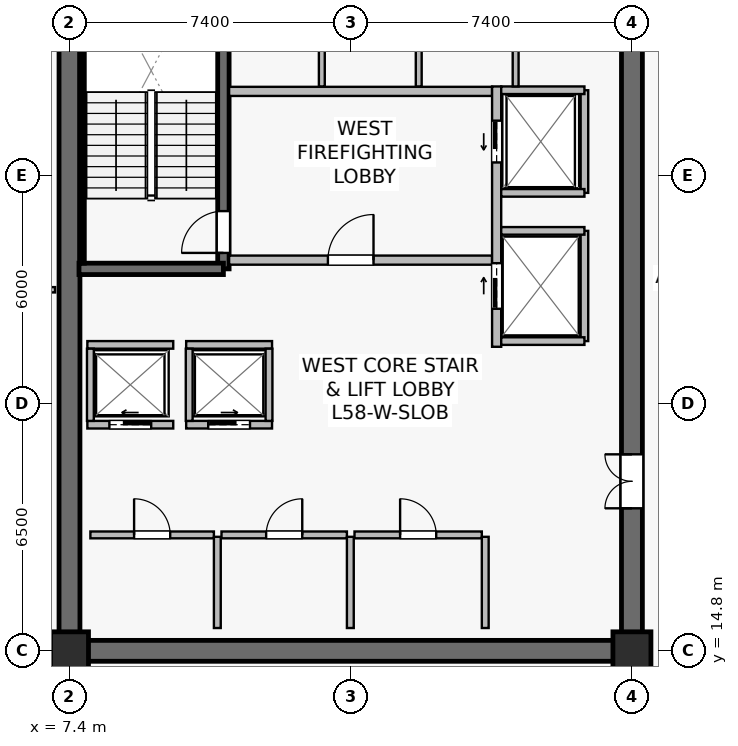
"""IFC4 building model, lengths in metres.
Left out: names, types, materials, properties, quantities, classifications, styles, units other than length and angle.
Written with IfcOpenShell. Run it as: python <this file> out.ifc"""

import sys

from ifc_helpers import new_model, si_unit, direction, frame, frame_2d, origin, origin_2d, place, context, subcontext, project, spatial, rectangle, extrude, source, transform, mapped, element, fill, save


model = new_model("IFC4")
c1 = context("Model", 3, precision=1e-05, world=origin(), true_north=direction((0.0, 1.0)))
c2 = subcontext(c1, "Body", "Model", "MODEL_VIEW")
j1 = project(units=[si_unit("LENGTHUNIT", "METRE"), si_unit("PLANEANGLEUNIT", "RADIAN")], contexts=[c1])
p1 = place(None, origin())
s1 = spatial("IfcSite", under=j1, at=p1, CompositionType="ELEMENT")
p2 = place(p1, origin())
s2 = spatial("IfcBuilding", under=s1, at=p2, CompositionType="ELEMENT")
p3 = place(p2, frame((0.0, 0.0, 242.4)))
s3 = spatial("IfcBuildingStorey", under=s2, at=p3, CompositionType="ELEMENT", Elevation=242.4)
p4 = place(p3, frame((7.125, 14.8, 0.0), z_axis=(0.0, 0.0, 1.0), x_axis=(1.0, 0.0, 0.0)))
e1 = element("IfcWall", 1, at=p4, inside=s3, PredefinedType="SHEAR", context=c2, shape_type="SweptSolid", body=[
    extrude(rectangle(XDim=15.35, YDim=0.55, at=frame_2d((7.675, 0.0))), origin(), (0.0, 0.0, 1.0), 3.8),
])
p5 = place(p3, frame((7.4, 15.075, 0.0), z_axis=(0.0, 0.0, 1.0), x_axis=(0.0, 1.0, 0.0)))
e2 = element("IfcWall", 2, at=p5, inside=s3, PredefinedType="SHEAR", context=c2, shape_type="SweptSolid", body=[
    extrude(rectangle(XDim=18.45, YDim=0.55, at=frame_2d((9.225, 0.0))), origin(), (0.0, 0.0, 1.0), 3.8),
])
p6 = place(p3, frame((22.2, 15.075, 0.0), z_axis=(0.0, 0.0, 1.0), x_axis=(0.0, 1.0, 0.0)))
e3 = element("IfcWall", 3, at=p6, inside=s3, PredefinedType="SHEAR", context=c2, shape_type="SweptSolid", body=[
    extrude(rectangle(XDim=18.45, YDim=0.55, at=frame_2d((9.225, 0.0))), origin(), (0.0, 0.0, 1.0), 3.8),
])
p7 = place(p6, frame((3.475, 0.0, 0.0)))
e4 = element("IfcOpeningElement", 4, at=p7, cuts=e3, PredefinedType="OPENING", context=c2, shape_type="SweptSolid", body=[
    extrude(rectangle(XDim=1.42, YDim=2.2, at=frame_2d((0.71, 1.1))), frame((0.0, 0.285, 0.0), z_axis=(0.0, -1.0, 0.0), x_axis=(1.0, 0.0, 0.0)), (0.0, 0.0, 1.0), 0.57),
])
p8 = place(p3, frame((11.45, 24.85, 0.0), z_axis=(0.0, 0.0, 1.0), x_axis=(0.0, 1.0, 0.0)))
e5 = element("IfcWall", 5, at=p8, inside=s3, PredefinedType="SHEAR", context=c2, shape_type="SweptSolid", body=[
    extrude(rectangle(XDim=8.63, YDim=0.3, at=frame_2d((4.315, 0.0))), origin(), (0.0, 0.0, 1.0), 3.8),
])
p9 = place(p8, frame((0.42, 0.0, 0.0)))
e6 = element("IfcOpeningElement", 6, at=p9, cuts=e5, PredefinedType="OPENING", context=c2, shape_type="SweptSolid", body=[
    extrude(rectangle(XDim=1.1, YDim=2.15, at=frame_2d((0.55, 1.075))), frame((0.0, 0.16, 0.0), z_axis=(0.0, -1.0, 0.0), x_axis=(1.0, 0.0, 0.0)), (0.0, 0.0, 1.0), 0.32),
])
p10 = place(p3, frame((7.65, 24.85, 0.0), z_axis=(0.0, 0.0, 1.0), x_axis=(1.0, 0.0, 0.0)))
e7 = element("IfcWall", 7, at=p10, inside=s3, PredefinedType="SHEAR", context=c2, shape_type="SweptSolid", body=[
    extrude(rectangle(XDim=3.8, YDim=0.3, at=frame_2d((1.9, 0.0))), origin(), (0.0, 0.0, 1.0), 3.8),
])
p11 = place(p3, frame((7.73, 25.0, 0.0), z_axis=(0.0, 0.0, 1.0), x_axis=(0.0, 1.0, 0.0)))
e8 = element("IfcWall", 8, at=p11, inside=s3, PredefinedType="SOLIDWALL", context=c2, shape_type="SweptSolid", body=[
    extrude(rectangle(XDim=8.32, YDim=0.12, at=frame_2d((4.16, 0.0))), origin(), (0.0, 0.0, 1.0), 3.8),
])
m1 = source(origin(), c2, "Body", "SweptSolid", [
    extrude(rectangle(XDim=1.0, YDim=1.0, at=origin_2d()), origin(), (0.0, 0.0, 1.0), 4.1),
])
for number, where, z_axis, x_axis in (
    (9, (7.4, 14.8, 0.0), (0.0, 0.0, 1.0), (1.0, 0.0, 0.0)),
    (10, (22.2, 14.8, 0.0), (0.0, 0.0, 1.0), (1.0, 0.0, 0.0)),
):
    element("IfcColumn", number, at=place(p3, frame(where, z_axis=z_axis, x_axis=x_axis)), inside=s3, PredefinedType="COLUMN", context=c2, shape_type="MappedRepresentation", body=[
        mapped(m1, transform((0.0, 0.0, 0.0), scale=1.0)),
    ])
p12 = place(p3, frame((11.6, 25.08, 0.0), z_axis=(0.0, 0.0, 1.0), x_axis=(1.0, 0.0, 0.0)))
e11 = element("IfcWall", 11, at=p12, inside=s3, PredefinedType="SOLIDWALL", context=c2, shape_type="SweptSolid", body=[
    extrude(rectangle(XDim=6.92, YDim=0.24, at=frame_2d((3.46, 0.0))), origin(), (0.0, 0.0, 1.0), 3.197),
])
p13 = place(p12, frame((2.6, 0.0, 0.0)))
e12 = element("IfcOpeningElement", 12, at=p13, cuts=e11, PredefinedType="OPENING", context=c2, shape_type="SweptSolid", body=[
    extrude(rectangle(XDim=1.2, YDim=2.16, at=frame_2d((0.6, 1.08))), frame((0.0, 0.13, 0.0), z_axis=(0.0, -1.0, 0.0), x_axis=(1.0, 0.0, 0.0)), (0.0, 0.0, 1.0), 0.26),
])
p14 = place(p3, frame((11.6, 29.52, 0.0), z_axis=(0.0, 0.0, 1.0), x_axis=(1.0, 0.0, 0.0)))
e13 = element("IfcWall", 13, at=p14, inside=s3, PredefinedType="SOLIDWALL", context=c2, shape_type="SweptSolid", body=[
    extrude(rectangle(XDim=6.92, YDim=0.24, at=frame_2d((3.46, 0.0))), origin(), (0.0, 0.0, 1.0), 3.197),
])
p15 = place(p3, frame((18.64, 22.8, 0.0), z_axis=(0.0, 0.0, 1.0), x_axis=(0.0, 1.0, 0.0)))
e14 = element("IfcWall", 14, at=p15, inside=s3, PredefinedType="SOLIDWALL", context=c2, shape_type="SweptSolid", body=[
    extrude(rectangle(XDim=6.85, YDim=0.24, at=frame_2d((3.425, 0.0))), origin(), (0.0, 0.0, 1.0), 2.935),
])
p16 = place(p15, frame((4.85, 0.0, 0.0)))
e15 = element("IfcOpeningElement", 15, at=p16, cuts=e14, PredefinedType="OPENING", context=c2, shape_type="SweptSolid", body=[
    extrude(rectangle(XDim=1.1, YDim=2.22, at=frame_2d((0.55, 1.11))), frame((0.0, 0.13, 0.0), z_axis=(0.0, -1.0, 0.0), x_axis=(1.0, 0.0, 0.0)), (0.0, 0.0, 1.0), 0.26),
])
p17 = place(p15, frame((1.0, 0.0, 0.0)))
e16 = element("IfcOpeningElement", 16, at=p17, cuts=e14, PredefinedType="OPENING", context=c2, shape_type="SweptSolid", body=[
    extrude(rectangle(XDim=1.2, YDim=2.22, at=frame_2d((0.6, 1.11))), frame((0.0, 0.13, 0.0), z_axis=(0.0, -1.0, 0.0), x_axis=(1.0, 0.0, 0.0)), (0.0, 0.0, 1.0), 0.26),
])
p18 = place(p3, frame((7.87, 20.75, 0.0), z_axis=(0.0, 0.0, 1.0), x_axis=(1.0, 0.0, 0.0)))
e17 = element("IfcWall", 17, at=p18, inside=s3, PredefinedType="SOLIDWALL", context=c2, shape_type="SweptSolid", body=[
    extrude(rectangle(XDim=2.26, YDim=0.2, at=frame_2d((1.13, 0.0))), origin(), (0.0, 0.0, 1.0), 3.8),
])
p19 = place(p18, frame((0.58, 0.0, 0.0)))
e18 = element("IfcOpeningElement", 18, at=p19, cuts=e17, PredefinedType="OPENING", context=c2, shape_type="SweptSolid", body=[
    extrude(rectangle(XDim=1.1, YDim=2.22, at=frame_2d((0.55, 1.11))), frame((0.0, 0.11, 0.0), z_axis=(0.0, -1.0, 0.0), x_axis=(1.0, 0.0, 0.0)), (0.0, 0.0, 1.0), 0.22),
])
p20 = place(p3, frame((7.87, 22.85, 0.0), z_axis=(0.0, 0.0, 1.0), x_axis=(1.0, 0.0, 0.0)))
e19 = element("IfcWall", 19, at=p20, inside=s3, PredefinedType="SOLIDWALL", context=c2, shape_type="SweptSolid", body=[
    extrude(rectangle(XDim=2.26, YDim=0.2, at=frame_2d((1.13, 0.0))), origin(), (0.0, 0.0, 1.0), 3.8),
])
p21 = place(p3, frame((7.95, 20.85, 0.0), z_axis=(0.0, 0.0, 1.0), x_axis=(0.0, 1.0, 0.0)))
e20 = element("IfcWall", 20, at=p21, inside=s3, PredefinedType="SOLIDWALL", context=c2, shape_type="SweptSolid", body=[
    extrude(rectangle(XDim=1.9, YDim=0.18, at=frame_2d((0.95, 0.0))), origin(), (0.0, 0.0, 1.0), 3.8),
])
p22 = place(p3, frame((10.47, 20.75, 0.0), z_axis=(0.0, 0.0, 1.0), x_axis=(1.0, 0.0, 0.0)))
e21 = element("IfcWall", 21, at=p22, inside=s3, PredefinedType="SOLIDWALL", context=c2, shape_type="SweptSolid", body=[
    extrude(rectangle(XDim=2.26, YDim=0.2, at=frame_2d((1.13, 0.0))), origin(), (0.0, 0.0, 1.0), 3.8),
])
p23 = place(p22, frame((0.58, 0.0, 0.0)))
e22 = element("IfcOpeningElement", 22, at=p23, cuts=e21, PredefinedType="OPENING", context=c2, shape_type="SweptSolid", body=[
    extrude(rectangle(XDim=1.1, YDim=2.22, at=frame_2d((0.55, 1.11))), frame((0.0, 0.11, 0.0), z_axis=(0.0, -1.0, 0.0), x_axis=(1.0, 0.0, 0.0)), (0.0, 0.0, 1.0), 0.22),
])
p24 = place(p3, frame((10.47, 22.85, 0.0), z_axis=(0.0, 0.0, 1.0), x_axis=(1.0, 0.0, 0.0)))
e23 = element("IfcWall", 23, at=p24, inside=s3, PredefinedType="SOLIDWALL", context=c2, shape_type="SweptSolid", body=[
    extrude(rectangle(XDim=2.26, YDim=0.2, at=frame_2d((1.13, 0.0))), origin(), (0.0, 0.0, 1.0), 3.8),
])
for number, where, z_axis, x_axis in (
    (24, (10.55, 20.85, 0.0), (0.0, 0.0, 1.0), (0.0, 1.0, 0.0)),
    (25, (12.65, 20.85, 0.0), (0.0, 0.0, 1.0), (0.0, 1.0, 0.0)),
):
    element("IfcWall", number, at=place(p3, frame(where, z_axis=z_axis, x_axis=x_axis)), inside=s3, PredefinedType="SOLIDWALL", context=c2, shape_type="SweptSolid", body=[
        extrude(rectangle(XDim=1.9, YDim=0.18, at=frame_2d((0.95, 0.0))), origin(), (0.0, 0.0, 1.0), 3.8),
    ])
p25 = place(p3, frame((20.95, 26.85, 0.0), z_axis=(0.0, 0.0, 1.0), x_axis=(0.0, 1.0, 0.0)))
e26 = element("IfcWall", 26, at=p25, inside=s3, PredefinedType="SOLIDWALL", context=c2, shape_type="SweptSolid", body=[
    extrude(rectangle(XDim=2.7, YDim=0.2, at=frame_2d((1.35, 0.0))), origin(), (0.0, 0.0, 1.0), 3.8),
])
p26 = place(p3, frame((18.76, 29.55, 0.0), z_axis=(0.0, 0.0, 1.0), x_axis=(1.0, 0.0, 0.0)))
e27 = element("IfcWall", 27, at=p26, inside=s3, PredefinedType="SOLIDWALL", context=c2, shape_type="SweptSolid", body=[
    extrude(rectangle(XDim=2.19, YDim=0.2, at=frame_2d((1.095, 0.0))), origin(), (0.0, 0.0, 1.0), 3.8),
])
p27 = place(p3, frame((18.76, 26.85, 0.0), z_axis=(0.0, 0.0, 1.0), x_axis=(1.0, 0.0, 0.0)))
e28 = element("IfcWall", 28, at=p27, inside=s3, PredefinedType="SOLIDWALL", context=c2, shape_type="SweptSolid", body=[
    extrude(rectangle(XDim=2.19, YDim=0.2, at=frame_2d((1.095, 0.0))), origin(), (0.0, 0.0, 1.0), 3.197),
])
p28 = place(p3, frame((20.95, 22.95, 0.0), z_axis=(0.0, 0.0, 1.0), x_axis=(0.0, 1.0, 0.0)))
e29 = element("IfcWall", 29, at=p28, inside=s3, PredefinedType="SOLIDWALL", context=c2, shape_type="SweptSolid", body=[
    extrude(rectangle(XDim=2.9, YDim=0.2, at=frame_2d((1.45, 0.0))), origin(), (0.0, 0.0, 1.0), 2.935),
])
for number, where, z_axis, x_axis in (
    (30, (18.76, 25.85, 0.0), (0.0, 0.0, 1.0), (1.0, 0.0, 0.0)),
    (31, (18.76, 22.95, 0.0), (0.0, 0.0, 1.0), (1.0, 0.0, 0.0)),
):
    element("IfcWall", number, at=place(p3, frame(where, z_axis=z_axis, x_axis=x_axis)), inside=s3, PredefinedType="SOLIDWALL", context=c2, shape_type="SweptSolid", body=[
        extrude(rectangle(XDim=2.19, YDim=0.2, at=frame_2d((1.095, 0.0))), origin(), (0.0, 0.0, 1.0), 3.8),
    ])
p29 = place(p3, frame((7.95, 17.85, 0.0), z_axis=(0.0, 0.0, 1.0), x_axis=(1.0, 0.0, 0.0)))
e32 = element("IfcWall", 32, at=p29, inside=s3, PredefinedType="SOLIDWALL", context=c2, shape_type="SweptSolid", body=[
    extrude(rectangle(XDim=3.25, YDim=0.18, at=frame_2d((1.625, 0.0))), origin(), (0.0, 0.0, 1.0), 3.8),
])
p30 = place(p29, frame((1.15, 0.0, 0.0)))
e33 = element("IfcOpeningElement", 33, at=p30, cuts=e32, PredefinedType="OPENING", context=c2, shape_type="SweptSolid", body=[
    extrude(rectangle(XDim=0.95, YDim=2.15, at=frame_2d((0.475, 1.075))), frame((0.0, 0.1, 0.0), z_axis=(0.0, -1.0, 0.0), x_axis=(1.0, 0.0, 0.0)), (0.0, 0.0, 1.0), 0.2),
])
p31 = place(p3, frame((11.29, 15.4, 0.0), z_axis=(0.0, 0.0, 1.0), x_axis=(0.0, 1.0, 0.0)))
e34 = element("IfcWall", 34, at=p31, inside=s3, PredefinedType="SOLIDWALL", context=c2, shape_type="SweptSolid", body=[
    extrude(rectangle(XDim=2.4, YDim=0.18, at=frame_2d((1.2, 0.0))), origin(), (0.0, 0.0, 1.0), 3.8),
])
p32 = place(p3, frame((11.4, 17.85, 0.0), z_axis=(0.0, 0.0, 1.0), x_axis=(1.0, 0.0, 0.0)))
e35 = element("IfcWall", 35, at=p32, inside=s3, PredefinedType="SOLIDWALL", context=c2, shape_type="SweptSolid", body=[
    extrude(rectangle(XDim=3.3, YDim=0.18, at=frame_2d((1.65, 0.0))), origin(), (0.0, 0.0, 1.0), 3.197),
])
p33 = place(p32, frame((1.175, 0.0, 0.0)))
e36 = element("IfcOpeningElement", 36, at=p33, cuts=e35, PredefinedType="OPENING", context=c2, shape_type="SweptSolid", body=[
    extrude(rectangle(XDim=0.95, YDim=2.15, at=frame_2d((0.475, 1.075))), frame((0.0, 0.1, 0.0), z_axis=(0.0, -1.0, 0.0), x_axis=(1.0, 0.0, 0.0)), (0.0, 0.0, 1.0), 0.2),
])
p34 = place(p3, frame((14.79, 15.4, 0.0), z_axis=(0.0, 0.0, 1.0), x_axis=(0.0, 1.0, 0.0)))
e37 = element("IfcWall", 37, at=p34, inside=s3, PredefinedType="SOLIDWALL", context=c2, shape_type="SweptSolid", body=[
    extrude(rectangle(XDim=2.4, YDim=0.18, at=frame_2d((1.2, 0.0))), origin(), (0.0, 0.0, 1.0), 3.197),
])
p35 = place(p3, frame((14.9, 17.85, 0.0), z_axis=(0.0, 0.0, 1.0), x_axis=(1.0, 0.0, 0.0)))
e38 = element("IfcWall", 38, at=p35, inside=s3, PredefinedType="SOLIDWALL", context=c2, shape_type="SweptSolid", body=[
    extrude(rectangle(XDim=3.35, YDim=0.18, at=frame_2d((1.675, 0.0))), origin(), (0.0, 0.0, 1.0), 3.197),
])
p36 = place(p35, frame((1.2, 0.0, 0.0)))
e39 = element("IfcOpeningElement", 39, at=p36, cuts=e38, PredefinedType="OPENING", context=c2, shape_type="SweptSolid", body=[
    extrude(rectangle(XDim=0.95, YDim=2.15, at=frame_2d((0.475, 1.075))), frame((0.0, 0.1, 0.0), z_axis=(0.0, -1.0, 0.0), x_axis=(1.0, 0.0, 0.0)), (0.0, 0.0, 1.0), 0.2),
])
p37 = place(p3, frame((18.34, 15.4, 0.0), z_axis=(0.0, 0.0, 1.0), x_axis=(0.0, 1.0, 0.0)))
e40 = element("IfcWall", 40, at=p37, inside=s3, PredefinedType="SOLIDWALL", context=c2, shape_type="SweptSolid", body=[
    extrude(rectangle(XDim=2.4, YDim=0.18, at=frame_2d((1.2, 0.0))), origin(), (0.0, 0.0, 1.0), 3.8),
])
for number, where, z_axis, x_axis in (
    (41, (14.04, 29.65, 0.0), (0.0, 0.0, 1.0), (0.0, 1.0, 0.0)),
    (42, (16.59, 29.65, 0.0), (0.0, 0.0, 1.0), (0.0, 1.0, 0.0)),
    (43, (19.14, 29.65, 0.0), (0.0, 0.0, 1.0), (0.0, 1.0, 0.0)),
):
    element("IfcWall", number, at=place(p3, frame(where, z_axis=z_axis, x_axis=x_axis)), inside=s3, PredefinedType="PLUMBINGWALL", context=c2, shape_type="SweptSolid", body=[
        extrude(rectangle(XDim=3.93, YDim=0.155, at=frame_2d((1.965, 0.0))), origin(), (0.0, 0.0, 1.0), 3.8),
    ])
p38 = place(p3, frame((4.11, 24.3, 0.0), z_axis=(0.0, 0.0, 1.0), x_axis=(1.0, 0.0, 0.0)))
e44 = element("IfcWall", 44, at=p38, inside=s3, PredefinedType="PARTITIONING", context=c2, shape_type="SweptSolid", body=[
    extrude(rectangle(XDim=2.91, YDim=0.14, at=frame_2d((1.455, 0.0))), origin(), (0.0, 0.0, 1.0), 3.8),
])
p39 = place(p3, frame((4.11, 14.505, 0.0), z_axis=(0.0, 0.0, 1.0), x_axis=(1.0, 0.0, 0.0)))
e45 = element("IfcWall", 45, at=p39, inside=s3, PredefinedType="PARTITIONING", context=c2, shape_type="SweptSolid", body=[
    extrude(rectangle(XDim=2.91, YDim=0.14, at=frame_2d((1.455, 0.0))), origin(), (0.0, 0.0, 1.0), 3.8),
])
p40 = place(p39, frame((1.005, 0.0, 0.0)))
e46 = element("IfcOpeningElement", 46, at=p40, cuts=e45, PredefinedType="OPENING", context=c2, shape_type="SweptSolid", body=[
    extrude(rectangle(XDim=0.9, YDim=2.1, at=frame_2d((0.45, 1.05))), frame((0.0, 0.08, 0.0), z_axis=(0.0, -1.0, 0.0), x_axis=(1.0, 0.0, 0.0)), (0.0, 0.0, 1.0), 0.16),
])
m2 = source(origin(), c2, "Body", "SweptSolid", [
    extrude(rectangle(XDim=1.1, YDim=2.15, at=frame_2d((0.55, 1.075))), frame((0.0, 0.025, 0.0), z_axis=(0.0, -1.0, 0.0), x_axis=(1.0, 0.0, 0.0)), (0.0, 0.0, 1.0), 0.05),
])
p41 = place(p9, origin())
e47 = element("IfcDoor", 47, at=p41, inside=s3, OperationType="SINGLE_SWING_LEFT", PredefinedType="DOOR", context=c2, shape_type="MappedRepresentation", body=[
    mapped(m2, transform((0.0, 0.0, 0.0), scale=1.0)),
])
fill(e6, e47)
m3 = source(origin(), c2, "Body", "SweptSolid", [
    extrude(rectangle(XDim=1.2, YDim=2.16, at=frame_2d((0.6, 1.08))), frame((0.0, 0.025, 0.0), z_axis=(0.0, -1.0, 0.0), x_axis=(1.0, 0.0, 0.0)), (0.0, 0.0, 1.0), 0.05),
])
p42 = place(p13, origin())
e48 = element("IfcDoor", 48, at=p42, inside=s3, OperationType="SINGLE_SWING_RIGHT", PredefinedType="DOOR", context=c2, shape_type="MappedRepresentation", body=[
    mapped(m3, transform((0.0, 0.0, 0.0), scale=1.0)),
])
fill(e12, e48)
m4 = source(origin(), c2, "Body", "SweptSolid", [
    extrude(rectangle(XDim=1.1, YDim=2.22, at=frame_2d((0.55, 1.11))), frame((0.0, 0.025, 0.0), z_axis=(0.0, -1.0, 0.0), x_axis=(1.0, 0.0, 0.0)), (0.0, 0.0, 1.0), 0.05),
])
p43 = place(p19, origin())
e49 = element("IfcDoor", 49, at=p43, inside=s3, OperationType="SLIDING_TO_LEFT", PredefinedType="USERDEFINED", context=c2, shape_type="MappedRepresentation", body=[
    mapped(m4, transform((0.0, 0.0, 0.0), scale=1.0)),
])
fill(e18, e49)
p44 = place(p23, origin())
e50 = element("IfcDoor", 50, at=p44, inside=s3, OperationType="SLIDING_TO_RIGHT", PredefinedType="USERDEFINED", context=c2, shape_type="MappedRepresentation", body=[
    mapped(m4, transform((0.0, 0.0, 0.0), scale=1.0)),
])
fill(e22, e50)
p45 = place(p16, origin())
e51 = element("IfcDoor", 51, at=p45, inside=s3, OperationType="SLIDING_TO_LEFT", PredefinedType="USERDEFINED", context=c2, shape_type="MappedRepresentation", body=[
    mapped(m4, transform((0.0, 0.0, 0.0), scale=1.0)),
])
fill(e15, e51)
m5 = source(origin(), c2, "Body", "SweptSolid", [
    extrude(rectangle(XDim=1.2, YDim=2.22, at=frame_2d((0.6, 1.11))), frame((0.0, 0.025, 0.0), z_axis=(0.0, -1.0, 0.0), x_axis=(1.0, 0.0, 0.0)), (0.0, 0.0, 1.0), 0.05),
])
p46 = place(p17, origin())
e52 = element("IfcDoor", 52, at=p46, inside=s3, OperationType="SLIDING_TO_RIGHT", PredefinedType="USERDEFINED", context=c2, shape_type="MappedRepresentation", body=[
    mapped(m5, transform((0.0, 0.0, 0.0), scale=1.0)),
])
fill(e16, e52)
m6 = source(origin(), c2, "Body", "SweptSolid", [
    extrude(rectangle(XDim=0.95, YDim=2.15, at=frame_2d((0.475, 1.075))), frame((0.0, 0.025, 0.0), z_axis=(0.0, -1.0, 0.0), x_axis=(1.0, 0.0, 0.0)), (0.0, 0.0, 1.0), 0.05),
])
p47 = place(p30, origin())
e53 = element("IfcDoor", 53, at=p47, inside=s3, OperationType="SINGLE_SWING_LEFT", PredefinedType="DOOR", context=c2, shape_type="MappedRepresentation", body=[
    mapped(m6, transform((0.0, 0.0, 0.0), scale=1.0)),
])
fill(e33, e53)
p48 = place(p33, origin())
e54 = element("IfcDoor", 54, at=p48, inside=s3, OperationType="SINGLE_SWING_RIGHT", PredefinedType="DOOR", context=c2, shape_type="MappedRepresentation", body=[
    mapped(m6, transform((0.0, 0.0, 0.0), scale=1.0)),
])
fill(e36, e54)
p49 = place(p36, origin())
e55 = element("IfcDoor", 55, at=p49, inside=s3, OperationType="SINGLE_SWING_LEFT", PredefinedType="DOOR", context=c2, shape_type="MappedRepresentation", body=[
    mapped(m6, transform((0.0, 0.0, 0.0), scale=1.0)),
])
fill(e39, e55)
m7 = source(origin(), c2, "Body", "SweptSolid", [
    extrude(rectangle(XDim=1.42, YDim=2.2, at=frame_2d((0.71, 1.1))), frame((0.0, 0.025, 0.0), z_axis=(0.0, -1.0, 0.0), x_axis=(1.0, 0.0, 0.0)), (0.0, 0.0, 1.0), 0.05),
])
p50 = place(p7, origin())
e56 = element("IfcDoor", 56, at=p50, inside=s3, OperationType="DOUBLE_DOOR_SINGLE_SWING", PredefinedType="DOOR", context=c2, shape_type="MappedRepresentation", body=[
    mapped(m7, transform((0.0, 0.0, 0.0), scale=1.0)),
])
fill(e4, e56)
save(model, sys.argv[1])
